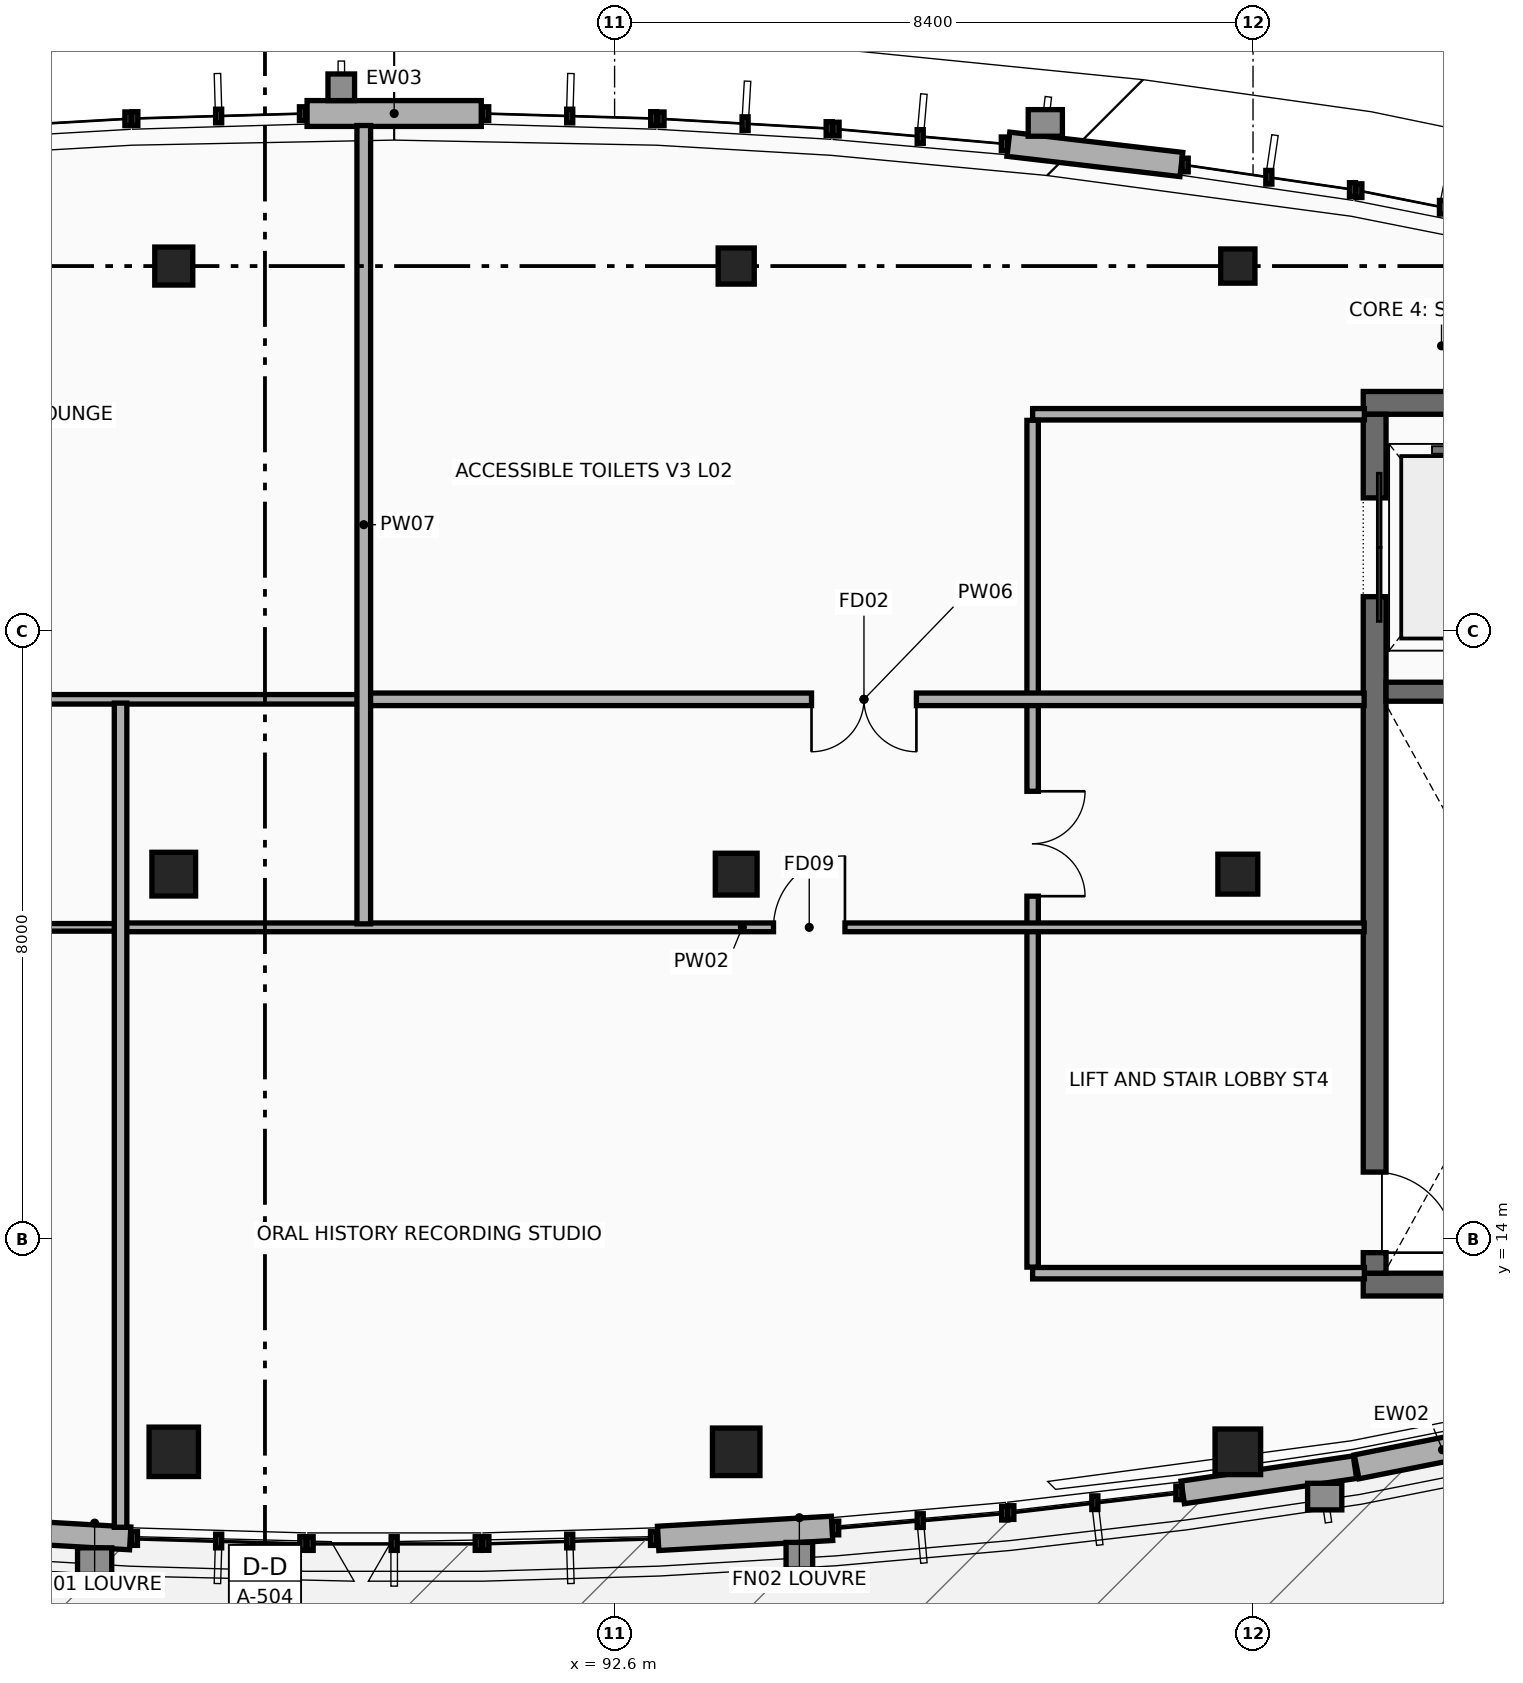
"""IFC4 building model, lengths in metres.
Left out: names, types, materials, properties, quantities, classifications, styles, units other than length and angle.
Written with IfcOpenShell. Run it as: python <this file> out.ifc"""

import sys

from ifc_helpers import new_model, si_unit, direction, frame, frame_2d, origin, origin_2d, place, context, subcontext, project, spatial, rectangle, extrude, element, fill, save


model = new_model("IFC4")
c1 = context("Model", 3, precision=1e-05, world=origin(), true_north=direction((0.0, 1.0)))
c2 = subcontext(c1, "Body", "Model", "MODEL_VIEW")
j1 = project(units=[si_unit("LENGTHUNIT", "METRE"), si_unit("PLANEANGLEUNIT", "RADIAN")], contexts=[c1])
p1 = place(None, origin())
s1 = spatial("IfcSite", under=j1, at=p1, CompositionType="ELEMENT")
p2 = place(p1, origin())
s2 = spatial("IfcBuilding", under=s1, at=p2, CompositionType="ELEMENT")
p3 = place(p2, frame((0.0, 0.0, 8.7)))
s3 = spatial("IfcBuildingStorey", under=s2, at=p3, CompositionType="ELEMENT", Elevation=8.7)
for number, where, z_axis, x_axis in (
    (1, (102.45, 13.4, 0.0), (0.0, 0.0, 1.0), (1.0, 0.0, 0.0)),
    (2, (107.15, 25.0, 0.0), (0.0, 0.0, 1.0), (-1.0, 0.0, 0.0)),
):
    element("IfcWall", number, at=place(p3, frame(where, z_axis=z_axis, x_axis=x_axis)), inside=s3, PredefinedType="SHEAR", context=c2, shape_type="SweptSolid", body=[
        extrude(rectangle(XDim=4.7, YDim=0.3, at=frame_2d((2.35, 0.0))), origin(), (0.0, 0.0, 1.0), 3.9),
    ])
p4 = place(p3, frame((102.6, 24.85, 0.0), z_axis=(0.0, 0.0, 1.0), x_axis=(0.0, -1.0, 0.0)))
e3 = element("IfcWall", 3, at=p4, inside=s3, PredefinedType="SHEAR", context=c2, shape_type="SweptSolid", body=[
    extrude(rectangle(XDim=11.3, YDim=0.3, at=frame_2d((5.65, 0.0))), origin(), (0.0, 0.0, 1.0), 3.9),
])
p5 = place(p4, frame((1.1, 0.0, 0.0)))
e4 = element("IfcOpeningElement", 4, at=p5, cuts=e3, PredefinedType="OPENING", context=c2, shape_type="SweptSolid", body=[
    extrude(rectangle(XDim=1.3, YDim=2.25, at=frame_2d((0.65, 1.125))), frame((0.0, 0.16, 0.0), z_axis=(0.0, -1.0, 0.0), x_axis=(1.0, 0.0, 0.0)), (0.0, 0.0, 1.0), 0.32),
])
p6 = place(p4, frame((9.97, 0.0, 0.0)))
e5 = element("IfcOpeningElement", 5, at=p6, cuts=e3, PredefinedType="OPENING", context=c2, shape_type="SweptSolid", body=[
    extrude(rectangle(XDim=1.06, YDim=2.15, at=frame_2d((0.53, 1.075))), frame((0.0, 0.16, 0.0), z_axis=(0.0, -1.0, 0.0), x_axis=(1.0, 0.0, 0.0)), (0.0, 0.0, 1.0), 0.32),
])
p7 = place(p3, frame((102.75, 21.2, 0.0), z_axis=(0.0, 0.0, 1.0), x_axis=(1.0, 0.0, 0.0)))
e6 = element("IfcWall", 6, at=p7, inside=s3, PredefinedType="SHEAR", context=c2, shape_type="SweptSolid", body=[
    extrude(rectangle(XDim=4.1, YDim=0.25, at=frame_2d((2.05, 0.0))), origin(), (0.0, 0.0, 1.0), 3.9),
])
p8 = place(p3, frame((86.8, 11.2, 0.0), z_axis=(0.0, 0.0, 1.0), x_axis=(1.0, 0.0, 0.0)))
e7 = element("IfcColumn", 7, at=p8, inside=s3, PredefinedType="COLUMN", context=c2, shape_type="SweptSolid", body=[
    extrude(rectangle(XDim=0.65, YDim=0.65, at=origin_2d()), origin(), (0.0, 0.0, 1.0), 3.9),
])
p9 = place(p3, frame((86.8, 18.8, 0.0), z_axis=(0.0, 0.0, 1.0), x_axis=(1.0, 0.0, 0.0)))
e8 = element("IfcColumn", 8, at=p9, inside=s3, PredefinedType="COLUMN", context=c2, shape_type="SweptSolid", body=[
    extrude(rectangle(XDim=0.575, YDim=0.575, at=origin_2d()), origin(), (0.0, 0.0, 1.0), 3.9),
])
p10 = place(p3, frame((86.8, 26.8, 0.0), z_axis=(0.0, 0.0, 1.0), x_axis=(1.0, 0.0, 0.0)))
e9 = element("IfcColumn", 9, at=p10, inside=s3, PredefinedType="COLUMN", context=c2, shape_type="SweptSolid", body=[
    extrude(rectangle(XDim=0.5, YDim=0.5, at=origin_2d()), origin(), (0.0, 0.0, 1.0), 3.9),
])
p11 = place(p3, frame((94.2, 11.2, 0.0), z_axis=(0.0, 0.0, 1.0), x_axis=(1.0, 0.0, 0.0)))
e10 = element("IfcColumn", 10, at=p11, inside=s3, PredefinedType="COLUMN", context=c2, shape_type="SweptSolid", body=[
    extrude(rectangle(XDim=0.625, YDim=0.625, at=origin_2d()), origin(), (0.0, 0.0, 1.0), 3.9),
])
p12 = place(p3, frame((94.2, 18.8, 0.0), z_axis=(0.0, 0.0, 1.0), x_axis=(1.0, 0.0, 0.0)))
e11 = element("IfcColumn", 11, at=p12, inside=s3, PredefinedType="COLUMN", context=c2, shape_type="SweptSolid", body=[
    extrude(rectangle(XDim=0.55, YDim=0.55, at=origin_2d()), origin(), (0.0, 0.0, 1.0), 3.9),
])
p13 = place(p3, frame((94.2, 26.8, 0.0), z_axis=(0.0, 0.0, 1.0), x_axis=(1.0, 0.0, 0.0)))
e12 = element("IfcColumn", 12, at=p13, inside=s3, PredefinedType="COLUMN", context=c2, shape_type="SweptSolid", body=[
    extrude(rectangle(XDim=0.475, YDim=0.475, at=origin_2d()), origin(), (0.0, 0.0, 1.0), 3.9),
])
p14 = place(p3, frame((100.8, 11.2, 0.0), z_axis=(0.0, 0.0, 1.0), x_axis=(1.0, 0.0, 0.0)))
e13 = element("IfcColumn", 13, at=p14, inside=s3, PredefinedType="COLUMN", context=c2, shape_type="SweptSolid", body=[
    extrude(rectangle(XDim=0.6, YDim=0.6, at=origin_2d()), origin(), (0.0, 0.0, 1.0), 3.9),
])
p15 = place(p3, frame((100.8, 18.8, 0.0), z_axis=(0.0, 0.0, 1.0), x_axis=(1.0, 0.0, 0.0)))
e14 = element("IfcColumn", 14, at=p15, inside=s3, PredefinedType="COLUMN", context=c2, shape_type="SweptSolid", body=[
    extrude(rectangle(XDim=0.525, YDim=0.525, at=origin_2d()), origin(), (0.0, 0.0, 1.0), 3.9),
])
p16 = place(p3, frame((100.8, 26.8, 0.0), z_axis=(0.0, 0.0, 1.0), x_axis=(1.0, 0.0, 0.0)))
e15 = element("IfcColumn", 15, at=p16, inside=s3, PredefinedType="COLUMN", context=c2, shape_type="SweptSolid", body=[
    extrude(rectangle(XDim=0.45, YDim=0.45, at=origin_2d()), origin(), (0.0, 0.0, 1.0), 3.9),
])
p17 = place(p3, frame((86.227, 10.061, 0.0), z_axis=(0.0, 0.0, 1.0), x_axis=(-0.998338056465, 0.05762920279, 0.0)))
e16 = element("IfcWall", 16, at=p17, inside=s3, PredefinedType="STANDARD", context=c2, shape_type="SweptSolid", body=[
    extrude(rectangle(XDim=2.292, YDim=0.3, at=frame_2d((1.146, 0.0))), origin(), (0.0, 0.0, 1.0), 3.664),
])
p18 = place(p3, frame((95.461, 10.193, 0.0), z_axis=(0.0, 0.0, 1.0), x_axis=(-0.998337702631, -0.057635332101, 0.0)))
e17 = element("IfcWall", 17, at=p18, inside=s3, PredefinedType="STANDARD", context=c2, shape_type="SweptSolid", body=[
    extrude(rectangle(XDim=2.292, YDim=0.32, at=frame_2d((1.146, 0.0))), origin(), (0.0, 0.0, 1.0), 3.243),
])
p19 = place(p3, frame((102.341, 10.998, 0.0), z_axis=(0.0, 0.0, 1.0), x_axis=(-0.989435718954, -0.144972266513, 0.0)))
e18 = element("IfcWall", 18, at=p19, inside=s3, PredefinedType="STANDARD", context=c2, shape_type="SweptSolid", body=[
    extrude(rectangle(XDim=2.29, YDim=0.3, at=frame_2d((1.145, 0.0))), origin(), (0.0, 0.0, 1.0), 3.187),
])
p20 = place(p3, frame((104.622, 11.451, 0.0), z_axis=(0.0, 0.0, 1.0), x_axis=(-0.980816424084, -0.194933686792, 0.0)))
e19 = element("IfcWall", 19, at=p20, inside=s3, PredefinedType="STANDARD", context=c2, shape_type="SweptSolid", body=[
    extrude(rectangle(XDim=2.303, YDim=0.32, at=frame_2d((1.152, 0.0))), origin(), (0.0, 0.0, 1.0), 3.187),
])
p21 = place(p3, frame((97.781, 28.403, 0.0), z_axis=(0.0, 0.0, 1.0), x_axis=(0.993184017059, -0.116556888507, 0.0)))
e20 = element("IfcWall", 20, at=p21, inside=s3, PredefinedType="STANDARD", context=c2, shape_type="SweptSolid", body=[
    extrude(rectangle(XDim=2.292, YDim=0.32, at=frame_2d((1.146, 0.0))), origin(), (0.0, 0.0, 1.0), 3.664),
])
p22 = place(p3, frame((88.554, 28.807, 0.0), z_axis=(0.0, 0.0, 1.0), x_axis=(1.0, 0.0, 0.0)))
e21 = element("IfcWall", 21, at=p22, inside=s3, PredefinedType="STANDARD", context=c2, shape_type="SweptSolid", body=[
    extrude(rectangle(XDim=2.292, YDim=0.34, at=frame_2d((1.146, 0.0))), origin(), (0.0, 0.0, 1.0), 3.664),
])
p23 = place(p3, frame((98.1, 13.55, 0.0), z_axis=(0.0, 0.0, 1.0), x_axis=(1.0, 0.0, 0.0)))
e22 = element("IfcWall", 22, at=p23, inside=s3, PredefinedType="PARTITIONING", context=c2, shape_type="SweptSolid", body=[
    extrude(rectangle(XDim=4.365, YDim=0.15, at=frame_2d((2.183, 0.0))), origin(), (0.0, 0.0, 1.0), 3.0),
])
p24 = place(p3, frame((102.465, 24.85, 0.0), z_axis=(0.0, 0.0, 1.0), x_axis=(-1.0, 0.0, 0.0)))
e23 = element("IfcWall", 23, at=p24, inside=s3, PredefinedType="PARTITIONING", context=c2, shape_type="SweptSolid", body=[
    extrude(rectangle(XDim=4.365, YDim=0.15, at=frame_2d((2.183, 0.0))), origin(), (0.0, 0.0, 1.0), 2.95),
])
p25 = place(p3, frame((98.1, 24.77, 0.0), z_axis=(0.0, 0.0, 1.0), x_axis=(0.0, -1.0, 0.0)))
e24 = element("IfcWall", 24, at=p25, inside=s3, PredefinedType="PARTITIONING", context=c2, shape_type="SweptSolid", body=[
    extrude(rectangle(XDim=11.14, YDim=0.15, at=frame_2d((5.57, 0.0))), origin(), (0.0, 0.0, 1.0), 3.187),
])
p26 = place(p25, frame((4.88, 0.0, 0.0)))
e25 = element("IfcOpeningElement", 25, at=p26, cuts=e24, PredefinedType="OPENING", context=c2, shape_type="SweptSolid", body=[
    extrude(rectangle(XDim=1.38, YDim=2.2, at=frame_2d((0.69, 1.1))), frame((0.0, 0.085, 0.0), z_axis=(0.0, -1.0, 0.0), x_axis=(1.0, 0.0, 0.0)), (0.0, 0.0, 1.0), 0.17),
])
p27 = place(p3, frame((71.117, 18.1, 0.0), z_axis=(0.0, 0.0, 1.0), x_axis=(1.0, 0.0, 0.0)))
e26 = element("IfcWall", 26, at=p27, inside=s3, PredefinedType="PARTITIONING", context=c2, shape_type="SweptSolid", body=[
    extrude(rectangle(XDim=14.983, YDim=0.1, at=frame_2d((7.492, 0.0))), origin(), (0.0, 0.0, 1.0), 3.075),
])
p28 = place(p27, frame((6.796, 0.0, 0.0)))
e27 = element("IfcOpeningElement", 27, at=p28, cuts=e26, PredefinedType="OPENING", context=c2, shape_type="SweptSolid", body=[
    extrude(rectangle(XDim=0.95, YDim=2.11, at=frame_2d((0.475, 1.055))), frame((0.0, 0.06, 0.0), z_axis=(0.0, -1.0, 0.0), x_axis=(1.0, 0.0, 0.0)), (0.0, 0.0, 1.0), 0.12),
])
p29 = place(p3, frame((86.1, 18.1, 0.0), z_axis=(0.0, 0.0, 1.0), x_axis=(1.0, 0.0, 0.0)))
e28 = element("IfcWall", 28, at=p29, inside=s3, PredefinedType="PARTITIONING", context=c2, shape_type="SweptSolid", body=[
    extrude(rectangle(XDim=16.362, YDim=0.115, at=frame_2d((8.181, 0.0))), origin(), (0.0, 0.0, 1.0), 3.0),
])
p30 = place(p29, frame((8.591, 0.0, 0.0)))
e29 = element("IfcOpeningElement", 29, at=p30, cuts=e28, PredefinedType="OPENING", context=c2, shape_type="SweptSolid", body=[
    extrude(rectangle(XDim=0.94, YDim=2.1, at=frame_2d((0.47, 1.05))), frame((0.0, 0.067, 0.0), z_axis=(0.0, -1.0, 0.0), x_axis=(1.0, 0.0, 0.0)), (0.0, 0.0, 1.0), 0.135),
])
p31 = place(p3, frame((89.3, 21.1, 0.0), z_axis=(0.0, 0.0, 1.0), x_axis=(-1.0, 0.0, 0.0)))
e30 = element("IfcWall", 30, at=p31, inside=s3, PredefinedType="PARTITIONING", context=c2, shape_type="SweptSolid", body=[
    extrude(rectangle(XDim=18.165, YDim=0.125, at=frame_2d((9.083, 0.0))), origin(), (0.0, 0.0, 1.0), 3.025),
])
p32 = place(p31, frame((8.272, 0.0, 0.0)))
e31 = element("IfcOpeningElement", 31, at=p32, cuts=e30, PredefinedType="OPENING", context=c2, shape_type="SweptSolid", body=[
    extrude(rectangle(XDim=1.62, YDim=2.32, at=frame_2d((0.81, 1.16))), frame((0.0, 0.073, 0.0), z_axis=(0.0, -1.0, 0.0), x_axis=(1.0, 0.0, 0.0)), (0.0, 0.0, 1.0), 0.145),
])
p33 = place(p3, frame((102.462, 21.1, 0.0), z_axis=(0.0, 0.0, 1.0), x_axis=(-1.0, 0.0, 0.0)))
e32 = element("IfcWall", 32, at=p33, inside=s3, PredefinedType="PARTITIONING", context=c2, shape_type="SweptSolid", body=[
    extrude(rectangle(XDim=13.162, YDim=0.165, at=frame_2d((6.581, 0.0))), origin(), (0.0, 0.0, 1.0), 2.95),
])
p34 = place(p33, frame((5.891, 0.0, 0.0)))
e33 = element("IfcOpeningElement", 33, at=p34, cuts=e32, PredefinedType="OPENING", context=c2, shape_type="SweptSolid", body=[
    extrude(rectangle(XDim=1.38, YDim=2.2, at=frame_2d((0.69, 1.1))), frame((0.0, 0.093, 0.0), z_axis=(0.0, -1.0, 0.0), x_axis=(1.0, 0.0, 0.0)), (0.0, 0.0, 1.0), 0.185),
])
p35 = place(p3, frame((86.1, 10.207, 0.0), z_axis=(0.0, 0.0, 1.0), x_axis=(0.0, 1.0, 0.0)))
e34 = element("IfcWall", 34, at=p35, inside=s3, PredefinedType="PARTITIONING", context=c2, shape_type="SweptSolid", body=[
    extrude(rectangle(XDim=10.843, YDim=0.165, at=frame_2d((5.421, 0.0))), origin(), (0.0, 0.0, 1.0), 3.194),
])
p36 = place(p3, frame((89.3, 18.146, 0.0), z_axis=(0.0, 0.0, 1.0), x_axis=(0.0, 1.0, 0.0)))
e35 = element("IfcWall", 35, at=p36, inside=s3, PredefinedType="PARTITIONING", context=c2, shape_type="SweptSolid", body=[
    extrude(rectangle(XDim=10.503, YDim=0.18, at=frame_2d((5.251, 0.0))), origin(), (0.0, 0.0, 1.0), 3.187),
])
p37 = place(p5, origin())
e36 = element("IfcDoor", 36, at=p37, inside=s3, OperationType="DOUBLE_DOOR_SLIDING", PredefinedType="DOOR", context=c2, shape_type="SweptSolid", body=[
    extrude(rectangle(XDim=1.3, YDim=2.25, at=frame_2d((0.65, 1.125))), frame((0.0, 0.025, 0.0), z_axis=(0.0, -1.0, 0.0), x_axis=(1.0, 0.0, 0.0)), (0.0, 0.0, 1.0), 0.05),
])
fill(e4, e36)
p38 = place(p6, origin())
e37 = element("IfcDoor", 37, at=p38, inside=s3, OperationType="SINGLE_SWING_RIGHT", PredefinedType="DOOR", context=c2, shape_type="SweptSolid", body=[
    extrude(rectangle(XDim=1.06, YDim=2.15, at=frame_2d((0.53, 1.075))), frame((0.0, 0.025, 0.0), z_axis=(0.0, -1.0, 0.0), x_axis=(1.0, 0.0, 0.0)), (0.0, 0.0, 1.0), 0.05),
])
fill(e5, e37)
p39 = place(p26, origin())
e38 = element("IfcDoor", 38, at=p39, inside=s3, OperationType="DOUBLE_DOOR_SINGLE_SWING", PredefinedType="DOOR", context=c2, shape_type="SweptSolid", body=[
    extrude(rectangle(XDim=1.38, YDim=2.2, at=frame_2d((0.69, 1.1))), frame((0.0, 0.025, 0.0), z_axis=(0.0, -1.0, 0.0), x_axis=(1.0, 0.0, 0.0)), (0.0, 0.0, 1.0), 0.05),
])
fill(e25, e38)
p40 = place(p30, origin())
e39 = element("IfcDoor", 39, at=p40, inside=s3, OperationType="SINGLE_SWING_RIGHT", PredefinedType="DOOR", context=c2, shape_type="SweptSolid", body=[
    extrude(rectangle(XDim=0.94, YDim=2.1, at=frame_2d((0.47, 1.05))), frame((0.0, 0.025, 0.0), z_axis=(0.0, -1.0, 0.0), x_axis=(1.0, 0.0, 0.0)), (0.0, 0.0, 1.0), 0.05),
])
fill(e29, e39)
p41 = place(p34, origin())
e40 = element("IfcDoor", 40, at=p41, inside=s3, OperationType="DOUBLE_DOOR_SINGLE_SWING", PredefinedType="DOOR", context=c2, shape_type="SweptSolid", body=[
    extrude(rectangle(XDim=1.38, YDim=2.2, at=frame_2d((0.69, 1.1))), frame((0.0, 0.025, 0.0), z_axis=(0.0, -1.0, 0.0), x_axis=(1.0, 0.0, 0.0)), (0.0, 0.0, 1.0), 0.05),
])
fill(e33, e40)
save(model, sys.argv[1])
